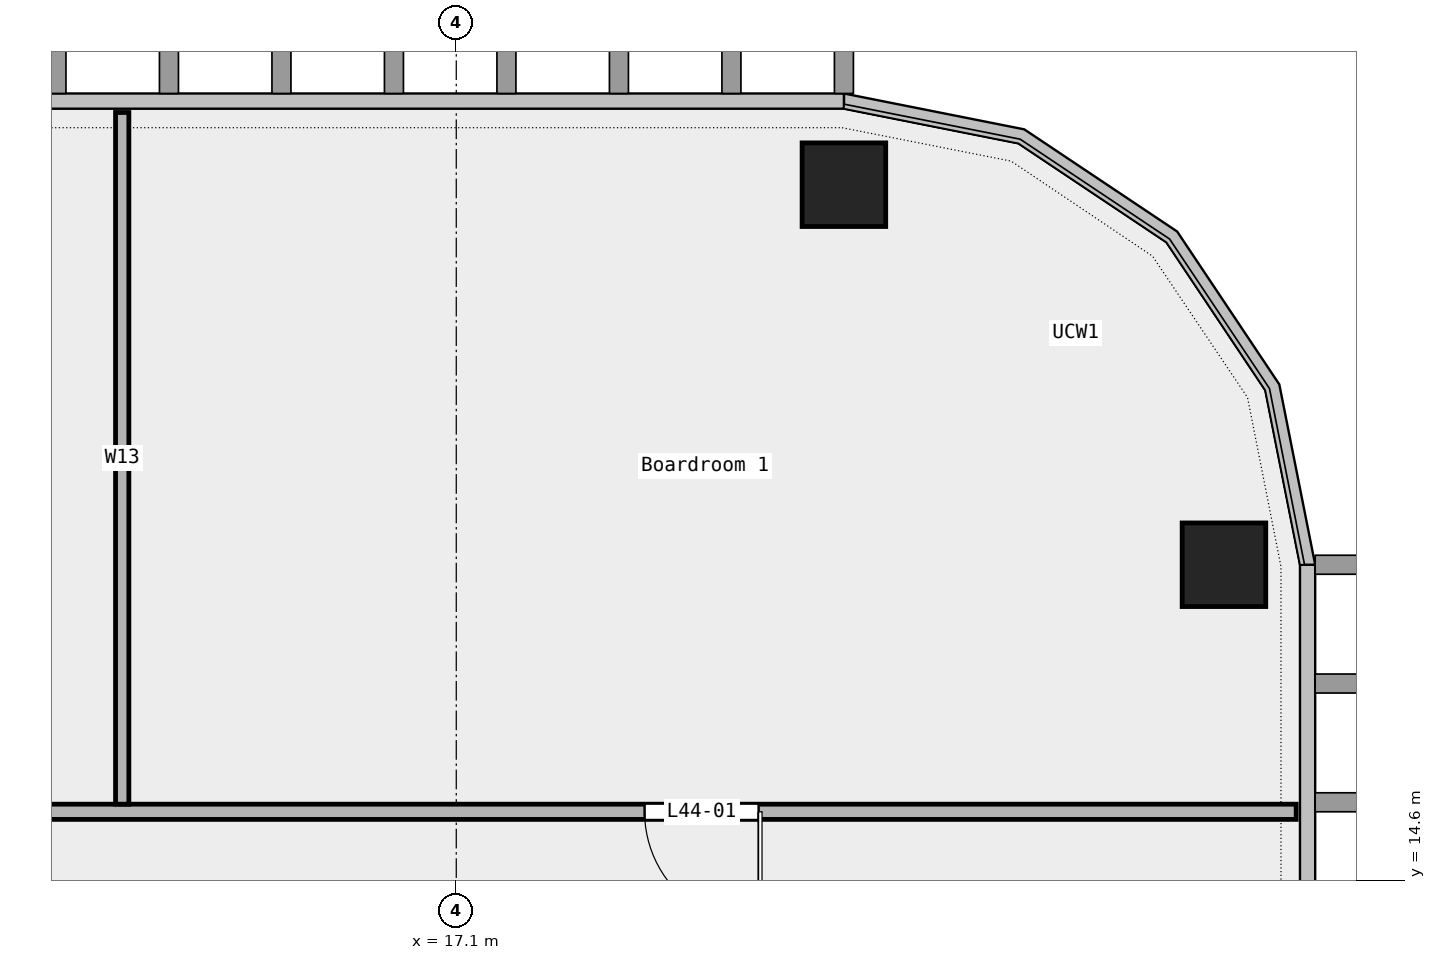
"""IFC4 building model, lengths in metres.
Left out: names, types, materials, properties, quantities, classifications, styles, units other than length and angle.
Written with IfcOpenShell. Run it as: python <this file> out.ifc"""

import sys

from ifc_helpers import new_model, si_unit, direction, frame, frame_2d, origin, origin_2d, place, context, subcontext, project, spatial, rectangle, extrude, element, fill, save


model = new_model("IFC4")
c1 = context("Model", 3, precision=1e-05, world=origin(), true_north=direction((0.0, 1.0)))
c2 = subcontext(c1, "Body", "Model", "MODEL_VIEW")
j1 = project(units=[si_unit("LENGTHUNIT", "METRE"), si_unit("PLANEANGLEUNIT", "RADIAN")], contexts=[c1])
p1 = place(None, origin())
s1 = spatial("IfcSite", under=j1, at=p1, CompositionType="ELEMENT")
p2 = place(p1, origin())
s2 = spatial("IfcBuilding", under=s1, at=p2, CompositionType="ELEMENT")
p3 = place(p2, frame((0.0, 0.0, 211.0)))
s3 = spatial("IfcBuildingStorey", under=s2, at=p3, CompositionType="ELEMENT", Elevation=211.0)
for number, where, z_axis, x_axis in (
    (1, (27.2, 18.75, 0.0), (0.0, 0.0, 1.0), (1.0, 0.0, 0.0)),
    (2, (22.2, 23.75, 0.0), (0.0, 0.0, 1.0), (1.0, 0.0, 0.0)),
):
    element("IfcColumn", number, at=place(p3, frame(where, z_axis=z_axis, x_axis=x_axis)), inside=s3, PredefinedType="COLUMN", context=c2, shape_type="SweptSolid", body=[
        extrude(rectangle(XDim=1.1, YDim=1.1, at=origin_2d()), origin(), (0.0, 0.0, 1.0), 3.6),
    ])
p4 = place(p3, frame((-17.76, 15.5, 0.0), z_axis=(0.0, 0.0, 1.0), x_axis=(1.0, 0.0, 0.0)))
e3 = element("IfcWall", 3, at=p4, inside=s3, PredefinedType="PARTITIONING", context=c2, shape_type="SweptSolid", body=[
    extrude(rectangle(XDim=45.91, YDim=0.2, at=frame_2d((22.955, 0.0))), origin(), (0.0, 0.0, 1.0), 3.6),
])
p5 = place(p4, frame((37.337, 0.0, 0.0)))
e4 = element("IfcOpeningElement", 4, at=p5, cuts=e3, PredefinedType="OPENING", context=c2, shape_type="SweptSolid", body=[
    extrude(rectangle(XDim=1.5, YDim=2.1, at=frame_2d((0.75, 1.05))), frame((0.0, 0.112, 0.0), z_axis=(0.0, -1.0, 0.0), x_axis=(1.0, 0.0, 0.0)), (0.0, 0.0, 1.0), 0.224),
])
p6 = place(p4, frame((24.633, 0.0, 0.0)))
e5 = element("IfcOpeningElement", 5, at=p6, cuts=e3, PredefinedType="OPENING", context=c2, shape_type="SweptSolid", body=[
    extrude(rectangle(XDim=1.5, YDim=2.1, at=frame_2d((0.75, 1.05))), frame((0.0, 0.112, 0.0), z_axis=(0.0, -1.0, 0.0), x_axis=(1.0, 0.0, 0.0)), (0.0, 0.0, 1.0), 0.224),
])
p7 = place(p4, frame((5.91, 0.0, 0.0)))
e6 = element("IfcOpeningElement", 6, at=p7, cuts=e3, PredefinedType="OPENING", context=c2, shape_type="SweptSolid", body=[
    extrude(rectangle(XDim=1.5, YDim=2.1, at=frame_2d((0.75, 1.05))), frame((0.0, 0.112, 0.0), z_axis=(0.0, -1.0, 0.0), x_axis=(1.0, 0.0, 0.0)), (0.0, 0.0, 1.0), 0.224),
])
p8 = place(p4, frame((16.21, 0.0, 0.0)))
e7 = element("IfcOpeningElement", 7, at=p8, cuts=e3, PredefinedType="OPENING", context=c2, shape_type="SweptSolid", body=[
    extrude(rectangle(XDim=1.2, YDim=2.1, at=frame_2d((0.6, 1.05))), frame((0.0, 0.112, 0.0), z_axis=(0.0, -1.0, 0.0), x_axis=(1.0, 0.0, 0.0)), (0.0, 0.0, 1.0), 0.224),
])
p9 = place(p3, frame((12.705, 15.6, 0.0), z_axis=(0.0, 0.0, 1.0), x_axis=(0.0, 1.0, 0.0)))
e8 = element("IfcWall", 8, at=p9, inside=s3, PredefinedType="PARTITIONING", context=c2, shape_type="SweptSolid", body=[
    extrude(rectangle(XDim=9.1, YDim=0.175, at=frame_2d((4.55, 0.0))), origin(), (0.0, 0.0, 1.0), 3.6),
])
p10 = place(p5, origin())
e9 = element("IfcDoor", 9, at=p10, inside=s3, OperationType="DOUBLE_DOOR_SINGLE_SWING", PredefinedType="DOOR", context=c2, shape_type="SweptSolid", body=[
    extrude(rectangle(XDim=1.5, YDim=2.1, at=frame_2d((0.75, 1.05))), frame((0.0, 0.025, 0.0), z_axis=(0.0, -1.0, 0.0), x_axis=(1.0, 0.0, 0.0)), (0.0, 0.0, 1.0), 0.05),
])
fill(e4, e9)
save(model, sys.argv[1])
